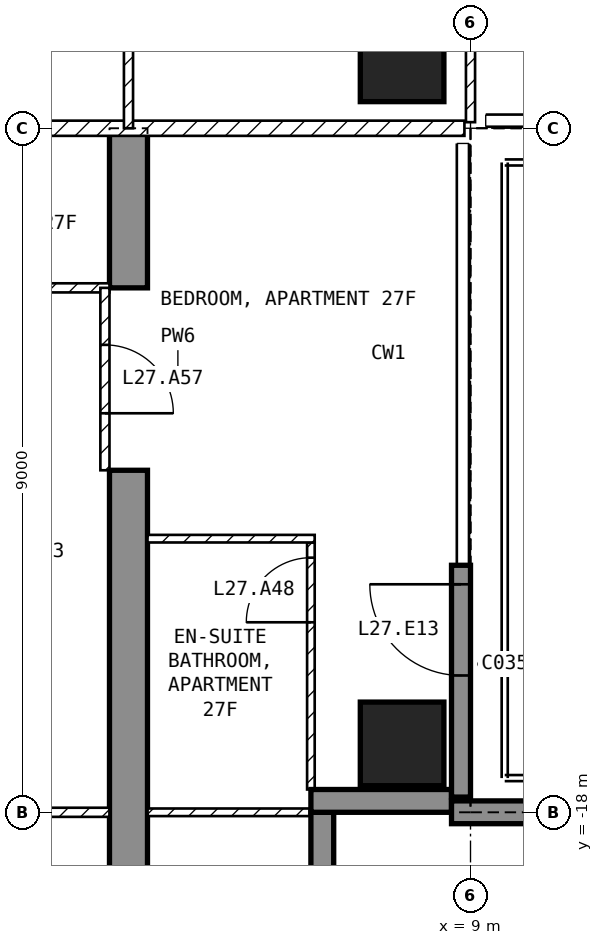
"""IFC4 building model, lengths in metres.
Left out: names, types, materials, properties, quantities, classifications, styles, units other than length and angle.
Written with IfcOpenShell. Run it as: python <this file> out.ifc"""

import sys

from ifc_helpers import new_model, si_unit, direction, frame, frame_2d, origin, origin_2d, place, context, subcontext, project, spatial, polyline, rectangle, outline, extrude, element, fill, save


model = new_model("IFC4")
c1 = context("Model", 3, precision=1e-05, world=origin(), true_north=direction((0.0, 1.0)))
c2 = subcontext(c1, "Body", "Model", "MODEL_VIEW")
j1 = project(units=[si_unit("LENGTHUNIT", "METRE"), si_unit("PLANEANGLEUNIT", "RADIAN")], contexts=[c1])
p1 = place(None, origin())
s1 = spatial("IfcSite", under=j1, at=p1, CompositionType="ELEMENT")
p2 = place(p1, origin())
s2 = spatial("IfcBuilding", under=s1, at=p2, CompositionType="ELEMENT")
p3 = place(p2, frame((0.0, 0.0, 116.4)))
s3 = spatial("IfcBuildingStorey", under=s2, at=p3, CompositionType="ELEMENT", Elevation=116.4)
for number, where, z_axis, x_axis in (
    (1, (8.1, -17.1, -0.25), (0.0, 0.0, 1.0), (1.0, 0.0, 0.0)),
    (2, (8.1, -8.1, -0.25), (0.0, 0.0, 1.0), (1.0, 0.0, 0.0)),
):
    element("IfcColumn", number, at=place(p3, frame(where, z_axis=z_axis, x_axis=x_axis)), inside=s3, PredefinedType="COLUMN", context=c2, shape_type="SweptSolid", body=[
        extrude(rectangle(XDim=1.1, YDim=1.1, at=origin_2d()), origin(), (0.0, 0.0, 1.0), 3.5),
    ])
p4 = place(p3, frame((4.25, -20.15, -0.25), z_axis=(1.0, 0.0, 0.0), x_axis=(0.0, 1.0, 0.0)))
e3 = element("IfcWall", 3, at=p4, inside=s3, PredefinedType="SHEAR", context=c2, shape_type="SweptSolid", body=[
    extrude(outline(polyline([(0.0, 0.0), (6.65, 0.0), (6.65, 2.65), (9.05, 2.65), (9.05, 0.0), (11.15, 0.0), (11.15, 3.5), (0.0, 3.5), (0.0, 0.0)])), origin(), (0.0, 0.0, 1.0), 0.5),
])
p5 = place(p3, frame((8.875, -17.8, 0.0), z_axis=(0.0, 0.0, 1.0), x_axis=(0.0, 1.0, 0.0)))
e4 = element("IfcWall", 4, at=p5, inside=s3, PredefinedType="SOLIDWALL", context=c2, shape_type="SweptSolid", body=[
    extrude(rectangle(XDim=3.05, YDim=0.25, at=frame_2d((1.525, 0.0))), origin(), (0.0, 0.0, 1.0), 3.25),
])
p6 = place(p5, frame((1.6, 0.0, 0.0)))
e5 = element("IfcOpeningElement", 5, at=p6, cuts=e4, PredefinedType="OPENING", context=c2, shape_type="SweptSolid", body=[
    extrude(rectangle(XDim=1.2, YDim=2.4, at=frame_2d((0.6, 1.2))), frame((0.0, 0.135, 0.0), z_axis=(0.0, -1.0, 0.0), x_axis=(1.0, 0.0, 0.0)), (0.0, 0.0, 1.0), 0.27),
])
p7 = place(p3, frame((7.05, -19.8, 0.0), z_axis=(0.0, 0.0, 1.0), x_axis=(0.0, 1.0, 0.0)))
e6 = element("IfcWall", 6, at=p7, inside=s3, PredefinedType="SOLIDWALL", context=c2, shape_type="SweptSolid", body=[
    extrude(rectangle(XDim=1.8, YDim=0.3, at=frame_2d((0.9, 0.0))), origin(), (0.0, 0.0, 1.0), 3.25),
])
p8 = place(p3, frame((6.9, -17.85, 0.0), z_axis=(0.0, 0.0, 1.0), x_axis=(1.0, 0.0, 0.0)))
e7 = element("IfcWall", 7, at=p8, inside=s3, PredefinedType="SOLIDWALL", context=c2, shape_type="SweptSolid", body=[
    extrude(rectangle(XDim=1.85, YDim=0.3, at=frame_2d((0.925, 0.0))), origin(), (0.0, 0.0, 1.0), 3.25),
])
p9 = place(p3, frame((8.75, -18.0, 0.0), z_axis=(0.0, 0.0, 1.0), x_axis=(1.0, 0.0, 0.0)))
e8 = element("IfcWall", 8, at=p9, inside=s3, PredefinedType="SOLIDWALL", context=c2, shape_type="SweptSolid", body=[
    extrude(rectangle(XDim=2.99, YDim=0.3, at=frame_2d((1.495, 0.0))), origin(), (0.0, 0.0, 1.0), 3.25),
])
p10 = place(p3, frame((8.92, -9.0, 0.0), z_axis=(0.0, 0.0, 1.0), x_axis=(-1.0, 0.0, 0.0)))
e9 = element("IfcWall", 9, at=p10, inside=s3, PredefinedType="PARTITIONING", context=c2, shape_type="SweptSolid", body=[
    extrude(rectangle(XDim=17.84, YDim=0.2, at=frame_2d((8.92, 0.0))), origin(), (0.0, 0.0, 1.0), 3.25),
])
p11 = place(p10, frame((8.42, 0.0, 0.0)))
e10 = element("IfcOpeningElement", 10, at=p11, cuts=e9, PredefinedType="OPENING", context=c2, shape_type="SweptSolid", body=[
    extrude(rectangle(XDim=1.0, YDim=2.1, at=frame_2d((0.5, 1.05))), frame((0.0, 0.11, 0.0), z_axis=(0.0, -1.0, 0.0), x_axis=(1.0, 0.0, 0.0)), (0.0, 0.0, 1.0), 0.22),
])
p12 = place(p3, frame((9.0, -8.92, 0.0), z_axis=(0.0, 0.0, 1.0), x_axis=(0.0, 1.0, 0.0)))
e11 = element("IfcWall", 11, at=p12, inside=s3, PredefinedType="PARTITIONING", context=c2, shape_type="SweptSolid", body=[
    extrude(rectangle(XDim=7.62, YDim=0.12, at=frame_2d((3.81, 0.0))), origin(), (0.0, 0.0, 1.0), 3.25),
])
p13 = place(p12, frame((5.12, 0.0, 0.0)))
e12 = element("IfcOpeningElement", 12, at=p13, cuts=e11, PredefinedType="OPENING", context=c2, shape_type="SweptSolid", body=[
    extrude(rectangle(XDim=0.9, YDim=2.1, at=frame_2d((0.45, 1.05))), frame((0.0, 0.07, 0.0), z_axis=(0.0, -1.0, 0.0), x_axis=(1.0, 0.0, 0.0)), (0.0, 0.0, 1.0), 0.14),
])
p14 = place(p3, frame((4.5, -9.0, 0.0), z_axis=(0.0, 0.0, 1.0), x_axis=(0.0, 1.0, 0.0)))
e13 = element("IfcWall", 13, at=p14, inside=s3, PredefinedType="PARTITIONING", context=c2, shape_type="SweptSolid", body=[
    extrude(rectangle(XDim=4.5, YDim=0.12, at=frame_2d((2.25, 0.0))), origin(), (0.0, 0.0, 1.0), 3.25),
])
p15 = place(p14, frame((3.36, 0.0, 0.0)))
e14 = element("IfcOpeningElement", 14, at=p15, cuts=e13, PredefinedType="OPENING", context=c2, shape_type="SweptSolid", body=[
    extrude(rectangle(XDim=0.9, YDim=2.1, at=frame_2d((0.45, 1.05))), frame((0.0, 0.07, 0.0), z_axis=(0.0, -1.0, 0.0), x_axis=(1.0, 0.0, 0.0)), (0.0, 0.0, 1.0), 0.14),
])
p16 = place(p3, frame((4.25, -11.1, 0.0), z_axis=(0.0, 0.0, 1.0), x_axis=(-1.0, 0.0, 0.0)))
e15 = element("IfcWall", 15, at=p16, inside=s3, PredefinedType="PARTITIONING", context=c2, shape_type="SweptSolid", body=[
    extrude(rectangle(XDim=6.35, YDim=0.12, at=frame_2d((3.175, 0.0))), origin(), (0.0, 0.0, 1.0), 3.25),
])
p17 = place(p16, frame((2.725, 0.0, 0.0)))
e16 = element("IfcOpeningElement", 16, at=p17, cuts=e15, PredefinedType="OPENING", context=c2, shape_type="SweptSolid", body=[
    extrude(rectangle(XDim=0.9, YDim=2.1, at=frame_2d((0.45, 1.05))), frame((0.0, 0.07, 0.0), z_axis=(0.0, -1.0, 0.0), x_axis=(1.0, 0.0, 0.0)), (0.0, 0.0, 1.0), 0.14),
])
p18 = place(p3, frame((4.25, -18.0, 0.0), z_axis=(0.0, 0.0, 1.0), x_axis=(-1.0, 0.0, 0.0)))
e17 = element("IfcWall", 17, at=p18, inside=s3, PredefinedType="PARTITIONING", context=c2, shape_type="SweptSolid", body=[
    extrude(rectangle(XDim=8.5, YDim=0.12, at=frame_2d((4.25, 0.0))), origin(), (0.0, 0.0, 1.0), 3.25),
])
p19 = place(p18, frame((1.925, 0.0, 0.0)))
e18 = element("IfcOpeningElement", 18, at=p19, cuts=e17, PredefinedType="OPENING", context=c2, shape_type="SweptSolid", body=[
    extrude(rectangle(XDim=0.9, YDim=2.1, at=frame_2d((0.45, 1.05))), frame((0.0, 0.07, 0.0), z_axis=(0.0, -1.0, 0.0), x_axis=(1.0, 0.0, 0.0)), (0.0, 0.0, 1.0), 0.14),
])
p20 = place(p3, frame((6.9, -17.7, 0.0), z_axis=(0.0, 0.0, 1.0), x_axis=(0.0, 1.0, 0.0)))
e19 = element("IfcWall", 19, at=p20, inside=s3, PredefinedType="PARTITIONING", context=c2, shape_type="SweptSolid", body=[
    extrude(rectangle(XDim=3.25, YDim=0.1, at=frame_2d((1.625, 0.0))), origin(), (0.0, 0.0, 1.0), 3.25),
])
p21 = place(p20, frame((2.2, 0.0, 0.0)))
e20 = element("IfcOpeningElement", 20, at=p21, cuts=e19, PredefinedType="OPENING", context=c2, shape_type="SweptSolid", body=[
    extrude(rectangle(XDim=0.85, YDim=2.1, at=frame_2d((0.425, 1.05))), frame((0.0, 0.06, 0.0), z_axis=(0.0, -1.0, 0.0), x_axis=(1.0, 0.0, 0.0)), (0.0, 0.0, 1.0), 0.12),
])
p22 = place(p3, frame((6.95, -14.4, 0.0), z_axis=(0.0, 0.0, 1.0), x_axis=(-1.0, 0.0, 0.0)))
e21 = element("IfcWall", 21, at=p22, inside=s3, PredefinedType="PARTITIONING", context=c2, shape_type="SweptSolid", body=[
    extrude(rectangle(XDim=2.2, YDim=0.1, at=frame_2d((1.1, 0.0))), origin(), (0.0, 0.0, 1.0), 3.25),
])
p23 = place(p3, frame((7.12, -18.0, 0.0), z_axis=(0.0, 0.0, 1.0), x_axis=(-1.0, 0.0, 0.0)))
e22 = element("IfcWall", 22, at=p23, inside=s3, PredefinedType="PARTITIONING", context=c2, shape_type="SweptSolid", body=[
    extrude(rectangle(XDim=2.37, YDim=0.1, at=frame_2d((1.185, 0.0))), origin(), (0.0, 0.0, 1.0), 3.25),
])
p24 = place(p3, frame((4.19, -11.1, 0.0), z_axis=(0.0, 0.0, 1.0), x_axis=(0.0, -1.0, 0.0)))
e23 = element("IfcWall", 23, at=p24, inside=s3, PredefinedType="PARTITIONING", context=c2, shape_type="SweptSolid", body=[
    extrude(rectangle(XDim=2.4, YDim=0.12, at=frame_2d((1.2, 0.0))), origin(), (0.0, 0.0, 1.0), 2.4),
])
p25 = place(p24, frame((0.75, 0.0, 0.0)))
e24 = element("IfcOpeningElement", 24, at=p25, cuts=e23, PredefinedType="OPENING", context=c2, shape_type="SweptSolid", body=[
    extrude(rectangle(XDim=0.9, YDim=2.1, at=frame_2d((0.45, 1.05))), frame((0.0, 0.07, 0.0), z_axis=(0.0, -1.0, 0.0), x_axis=(1.0, 0.0, 0.0)), (0.0, 0.0, 1.0), 0.14),
])
p26 = place(p6, origin())
e25 = element("IfcDoor", 25, at=p26, inside=s3, OperationType="SINGLE_SWING_RIGHT", PredefinedType="DOOR", context=c2, shape_type="SweptSolid", body=[
    extrude(rectangle(XDim=1.2, YDim=2.4, at=frame_2d((0.6, 1.2))), frame((0.0, 0.025, 0.0), z_axis=(0.0, -1.0, 0.0), x_axis=(1.0, 0.0, 0.0)), (0.0, 0.0, 1.0), 0.05),
])
fill(e5, e25)
p27 = place(p21, origin())
e26 = element("IfcDoor", 26, at=p27, inside=s3, OperationType="SINGLE_SWING_LEFT", PredefinedType="DOOR", context=c2, shape_type="SweptSolid", body=[
    extrude(rectangle(XDim=0.85, YDim=2.1, at=frame_2d((0.425, 1.05))), frame((0.0, 0.025, 0.0), z_axis=(0.0, -1.0, 0.0), x_axis=(1.0, 0.0, 0.0)), (0.0, 0.0, 1.0), 0.05),
])
fill(e20, e26)
p28 = place(p25, origin())
e27 = element("IfcDoor", 27, at=p28, inside=s3, OperationType="SINGLE_SWING_RIGHT", PredefinedType="DOOR", context=c2, shape_type="SweptSolid", body=[
    extrude(rectangle(XDim=0.9, YDim=2.1, at=frame_2d((0.45, 1.05))), frame((0.0, 0.025, 0.0), z_axis=(0.0, -1.0, 0.0), x_axis=(1.0, 0.0, 0.0)), (0.0, 0.0, 1.0), 0.05),
])
fill(e24, e27)
save(model, sys.argv[1])
